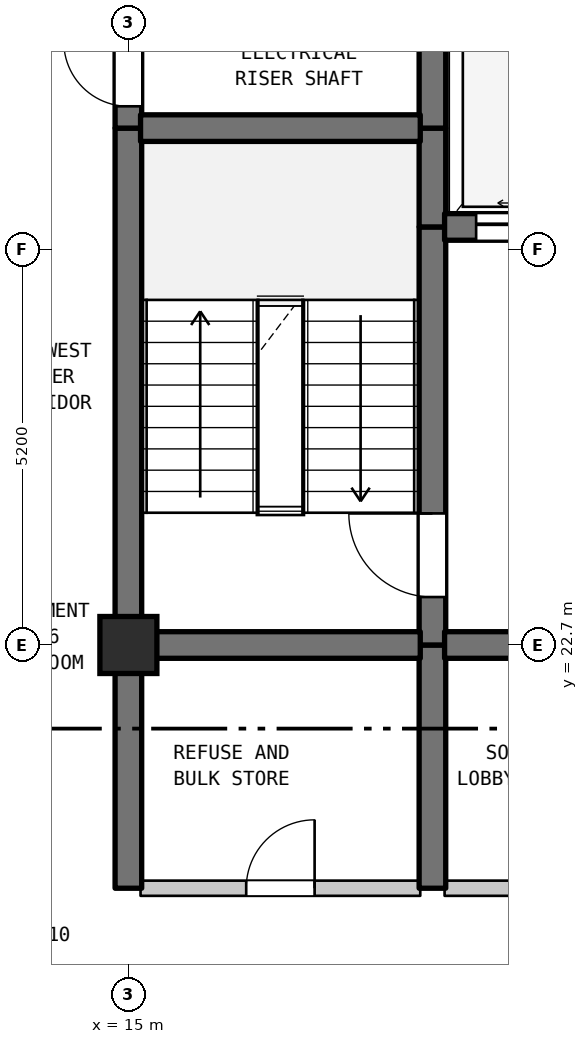
"""IFC4 building model, lengths in metres.
Left out: names, types, materials, properties, quantities, classifications, styles, units other than length and angle.
Written with IfcOpenShell. Run it as: python <this file> out.ifc"""

import sys

from ifc_helpers import new_model, si_unit, direction, frame, frame_2d, origin, origin_2d, place, context, subcontext, project, spatial, rectangle, extrude, element, fill, save


model = new_model("IFC4")
c1 = context("Model", 3, precision=1e-05, world=origin(), true_north=direction((0.0, 1.0)))
c2 = subcontext(c1, "Body", "Model", "MODEL_VIEW")
j1 = project(units=[si_unit("LENGTHUNIT", "METRE"), si_unit("PLANEANGLEUNIT", "RADIAN")], contexts=[c1])
p1 = place(None, origin())
s1 = spatial("IfcSite", under=j1, at=p1, CompositionType="ELEMENT")
p2 = place(p1, origin())
s2 = spatial("IfcBuilding", under=s1, at=p2, CompositionType="ELEMENT")
p3 = place(p2, frame((0.0, 0.0, 276.9)))
s3 = spatial("IfcBuildingStorey", under=s2, at=p3, CompositionType="ELEMENT", Elevation=276.9)
p4 = place(p3, frame((15.0, 22.7, 0.0), z_axis=(0.0, 0.0, 1.0), x_axis=(1.0, 0.0, 0.0)))
e1 = element("IfcColumn", 1, at=p4, inside=s3, PredefinedType="COLUMN", context=c2, shape_type="SweptSolid", body=[
    extrude(rectangle(XDim=0.75, YDim=0.75, at=origin_2d()), origin(), (0.0, 0.0, 1.0), 3.7),
])
p5 = place(p3, frame((15.0, 19.5, 0.0), z_axis=(0.0, 0.0, 1.0), x_axis=(0.0, 1.0, 0.0)))
e2 = element("IfcWall", 2, at=p5, inside=s3, PredefinedType="SHEAR", context=c2, shape_type="SweptSolid", body=[
    extrude(rectangle(XDim=3.2, YDim=0.35, at=frame_2d((1.6, 0.0))), origin(), (0.0, 0.0, 1.0), 3.39),
])
p6 = place(p3, frame((15.0, 22.7, 0.0), z_axis=(0.0, 0.0, 1.0), x_axis=(0.0, 1.0, 0.0)))
e3 = element("IfcWall", 3, at=p6, inside=s3, PredefinedType="SHEAR", context=c2, shape_type="SweptSolid", body=[
    extrude(rectangle(XDim=6.8, YDim=0.35, at=frame_2d((3.4, 0.0))), origin(), (0.0, 0.0, 1.0), 3.39),
])
p7 = place(p3, frame((15.0, 29.5, 0.0), z_axis=(0.0, 0.0, 1.0), x_axis=(0.0, 1.0, 0.0)))
e4 = element("IfcWall", 4, at=p7, inside=s3, PredefinedType="SHEAR", context=c2, shape_type="SweptSolid", body=[
    extrude(rectangle(XDim=1.6, YDim=0.35, at=frame_2d((0.8, 0.0))), origin(), (0.0, 0.0, 1.0), 3.39),
])
p8 = place(p7, frame((0.287, 0.0, 0.0)))
e5 = element("IfcOpeningElement", 5, at=p8, cuts=e4, PredefinedType="OPENING", context=c2, shape_type="SweptSolid", body=[
    extrude(rectangle(XDim=0.85, YDim=2.1, at=frame_2d((0.425, 1.05))), frame((0.0, 0.185, 0.0), z_axis=(0.0, -1.0, 0.0), x_axis=(1.0, 0.0, 0.0)), (0.0, 0.0, 1.0), 0.37),
])
p9 = place(p3, frame((19.0, 19.5, 0.0), z_axis=(0.0, 0.0, 1.0), x_axis=(0.0, 1.0, 0.0)))
e6 = element("IfcWall", 6, at=p9, inside=s3, PredefinedType="SHEAR", context=c2, shape_type="SweptSolid", body=[
    extrude(rectangle(XDim=3.2, YDim=0.35, at=frame_2d((1.6, 0.0))), origin(), (0.0, 0.0, 1.0), 3.39),
])
p10 = place(p3, frame((19.0, 22.7, 0.0), z_axis=(0.0, 0.0, 1.0), x_axis=(0.0, 1.0, 0.0)))
e7 = element("IfcWall", 7, at=p10, inside=s3, PredefinedType="SHEAR", context=c2, shape_type="SweptSolid", body=[
    extrude(rectangle(XDim=5.5, YDim=0.35, at=frame_2d((2.75, 0.0))), origin(), (0.0, 0.0, 1.0), 3.39),
])
p11 = place(p10, frame((0.631, 0.0, 0.0)))
e8 = element("IfcOpeningElement", 8, at=p11, cuts=e7, PredefinedType="OPENING", context=c2, shape_type="SweptSolid", body=[
    extrude(rectangle(XDim=1.1, YDim=2.15, at=frame_2d((0.55, 1.075))), frame((0.0, 0.185, 0.0), z_axis=(0.0, -1.0, 0.0), x_axis=(1.0, 0.0, 0.0)), (0.0, 0.0, 1.0), 0.37),
])
p12 = place(p3, frame((19.0, 28.2, 0.0), z_axis=(0.0, 0.0, 1.0), x_axis=(0.0, 1.0, 0.0)))
e9 = element("IfcWall", 9, at=p12, inside=s3, PredefinedType="SHEAR", context=c2, shape_type="SweptSolid", body=[
    extrude(rectangle(XDim=1.3, YDim=0.35, at=frame_2d((0.65, 0.0))), origin(), (0.0, 0.0, 1.0), 3.39),
])
p13 = place(p3, frame((19.0, 29.5, 0.0), z_axis=(0.0, 0.0, 1.0), x_axis=(0.0, 1.0, 0.0)))
e10 = element("IfcWall", 10, at=p13, inside=s3, PredefinedType="SHEAR", context=c2, shape_type="SweptSolid", body=[
    extrude(rectangle(XDim=5.5, YDim=0.35, at=frame_2d((2.75, 0.0))), origin(), (0.0, 0.0, 1.0), 3.39),
])
p14 = place(p13, frame((2.025, 0.0, 0.0)))
e11 = element("IfcOpeningElement", 11, at=p14, cuts=e10, PredefinedType="OPENING", context=c2, shape_type="SweptSolid", body=[
    extrude(rectangle(XDim=1.1, YDim=2.15, at=frame_2d((0.55, 1.075))), frame((0.0, 0.185, 0.0), z_axis=(0.0, -1.0, 0.0), x_axis=(1.0, 0.0, 0.0)), (0.0, 0.0, 1.0), 0.37),
])
p15 = place(p3, frame((15.16, 19.5, 0.0), z_axis=(0.0, 0.0, 1.0), x_axis=(1.0, 0.0, 0.0)))
e12 = element("IfcWall", 12, at=p15, inside=s3, PredefinedType="STANDARD", context=c2, shape_type="SweptSolid", body=[
    extrude(rectangle(XDim=3.68, YDim=0.2, at=frame_2d((1.84, 0.0))), origin(), (0.0, 0.0, 1.0), 3.39),
])
p16 = place(p15, frame((1.39, 0.0, 0.0)))
e13 = element("IfcOpeningElement", 13, at=p16, cuts=e12, PredefinedType="OPENING", context=c2, shape_type="SweptSolid", body=[
    extrude(rectangle(XDim=0.9, YDim=2.15, at=frame_2d((0.45, 1.075))), frame((0.0, 0.11, 0.0), z_axis=(0.0, -1.0, 0.0), x_axis=(1.0, 0.0, 0.0)), (0.0, 0.0, 1.0), 0.22),
])
p17 = place(p3, frame((19.16, 19.5, 0.0), z_axis=(0.0, 0.0, 1.0), x_axis=(1.0, 0.0, 0.0)))
e14 = element("IfcWall", 14, at=p17, inside=s3, PredefinedType="STANDARD", context=c2, shape_type="SweptSolid", body=[
    extrude(rectangle(XDim=4.48, YDim=0.2, at=frame_2d((2.24, 0.0))), origin(), (0.0, 0.0, 1.0), 3.39),
])
p18 = place(p17, frame((1.64, 0.0, 0.0)))
e15 = element("IfcOpeningElement", 15, at=p18, cuts=e14, PredefinedType="OPENING", context=c2, shape_type="SweptSolid", body=[
    extrude(rectangle(XDim=1.2, YDim=2.2, at=frame_2d((0.6, 1.1))), frame((0.0, 0.11, 0.0), z_axis=(0.0, -1.0, 0.0), x_axis=(1.0, 0.0, 0.0)), (0.0, 0.0, 1.0), 0.22),
])
p19 = place(p3, frame((15.16, 22.7, 0.0), z_axis=(0.0, 0.0, 1.0), x_axis=(1.0, 0.0, 0.0)))
e16 = element("IfcWall", 16, at=p19, inside=s3, PredefinedType="SHEAR", context=c2, shape_type="SweptSolid", body=[
    extrude(rectangle(XDim=3.68, YDim=0.35, at=frame_2d((1.84, 0.0))), origin(), (0.0, 0.0, 1.0), 3.39),
])
p20 = place(p3, frame((19.16, 22.7, 0.0), z_axis=(0.0, 0.0, 1.0), x_axis=(1.0, 0.0, 0.0)))
e17 = element("IfcWall", 17, at=p20, inside=s3, PredefinedType="SHEAR", context=c2, shape_type="SweptSolid", body=[
    extrude(rectangle(XDim=4.48, YDim=0.35, at=frame_2d((2.24, 0.0))), origin(), (0.0, 0.0, 1.0), 3.39),
])
p21 = place(p20, frame((1.64, 0.0, 0.0)))
e18 = element("IfcOpeningElement", 18, at=p21, cuts=e17, PredefinedType="OPENING", context=c2, shape_type="SweptSolid", body=[
    extrude(rectangle(XDim=1.2, YDim=2.2, at=frame_2d((0.6, 1.1))), frame((0.0, 0.185, 0.0), z_axis=(0.0, -1.0, 0.0), x_axis=(1.0, 0.0, 0.0)), (0.0, 0.0, 1.0), 0.37),
])
p22 = place(p3, frame((19.16, 28.2, 0.0), z_axis=(0.0, 0.0, 1.0), x_axis=(1.0, 0.0, 0.0)))
e19 = element("IfcWall", 19, at=p22, inside=s3, PredefinedType="SHEAR", context=c2, shape_type="SweptSolid", body=[
    extrude(rectangle(XDim=4.48, YDim=0.35, at=frame_2d((2.24, 0.0))), origin(), (0.0, 0.0, 1.0), 3.39),
])
p23 = place(p22, frame((0.415, 0.0, 0.0)))
e20 = element("IfcOpeningElement", 20, at=p23, cuts=e19, PredefinedType="OPENING", context=c2, shape_type="SweptSolid", body=[
    extrude(rectangle(XDim=1.25, YDim=2.2, at=frame_2d((0.625, 1.1))), frame((0.0, 0.185, 0.0), z_axis=(0.0, -1.0, 0.0), x_axis=(1.0, 0.0, 0.0)), (0.0, 0.0, 1.0), 0.37),
])
p24 = place(p22, frame((2.815, 0.0, 0.0)))
e21 = element("IfcOpeningElement", 21, at=p24, cuts=e19, PredefinedType="OPENING", context=c2, shape_type="SweptSolid", body=[
    extrude(rectangle(XDim=1.25, YDim=2.2, at=frame_2d((0.625, 1.1))), frame((0.0, 0.185, 0.0), z_axis=(0.0, -1.0, 0.0), x_axis=(1.0, 0.0, 0.0)), (0.0, 0.0, 1.0), 0.37),
])
p25 = place(p3, frame((15.16, 29.5, 0.0), z_axis=(0.0, 0.0, 1.0), x_axis=(1.0, 0.0, 0.0)))
e22 = element("IfcWall", 22, at=p25, inside=s3, PredefinedType="SHEAR", context=c2, shape_type="SweptSolid", body=[
    extrude(rectangle(XDim=3.68, YDim=0.35, at=frame_2d((1.84, 0.0))), origin(), (0.0, 0.0, 1.0), 3.39),
])
p26 = place(p8, origin())
e23 = element("IfcDoor", 23, at=p26, inside=s3, OperationType="SINGLE_SWING_RIGHT", PredefinedType="DOOR", context=c2, shape_type="SweptSolid", body=[
    extrude(rectangle(XDim=0.85, YDim=2.1, at=frame_2d((0.425, 1.05))), frame((0.0, 0.025, 0.0), z_axis=(0.0, -1.0, 0.0), x_axis=(1.0, 0.0, 0.0)), (0.0, 0.0, 1.0), 0.05),
])
fill(e5, e23)
p27 = place(p11, origin())
e24 = element("IfcDoor", 24, at=p27, inside=s3, OperationType="SINGLE_SWING_RIGHT", PredefinedType="DOOR", context=c2, shape_type="SweptSolid", body=[
    extrude(rectangle(XDim=1.1, YDim=2.15, at=frame_2d((0.55, 1.075))), frame((0.0, 0.025, 0.0), z_axis=(0.0, -1.0, 0.0), x_axis=(1.0, 0.0, 0.0)), (0.0, 0.0, 1.0), 0.05),
])
fill(e8, e24)
p28 = place(p16, origin())
e25 = element("IfcDoor", 25, at=p28, inside=s3, OperationType="SINGLE_SWING_RIGHT", PredefinedType="DOOR", context=c2, shape_type="SweptSolid", body=[
    extrude(rectangle(XDim=0.9, YDim=2.15, at=frame_2d((0.45, 1.075))), frame((0.0, 0.025, 0.0), z_axis=(0.0, -1.0, 0.0), x_axis=(1.0, 0.0, 0.0)), (0.0, 0.0, 1.0), 0.05),
])
fill(e13, e25)
p29 = place(p23, origin())
e26 = element("IfcDoor", 26, at=p29, inside=s3, OperationType="DOUBLE_DOOR_SLIDING", PredefinedType="DOOR", context=c2, shape_type="SweptSolid", body=[
    extrude(rectangle(XDim=1.25, YDim=2.2, at=frame_2d((0.625, 1.1))), frame((0.0, 0.025, 0.0), z_axis=(0.0, -1.0, 0.0), x_axis=(1.0, 0.0, 0.0)), (0.0, 0.0, 1.0), 0.05),
])
fill(e20, e26)
save(model, sys.argv[1])
